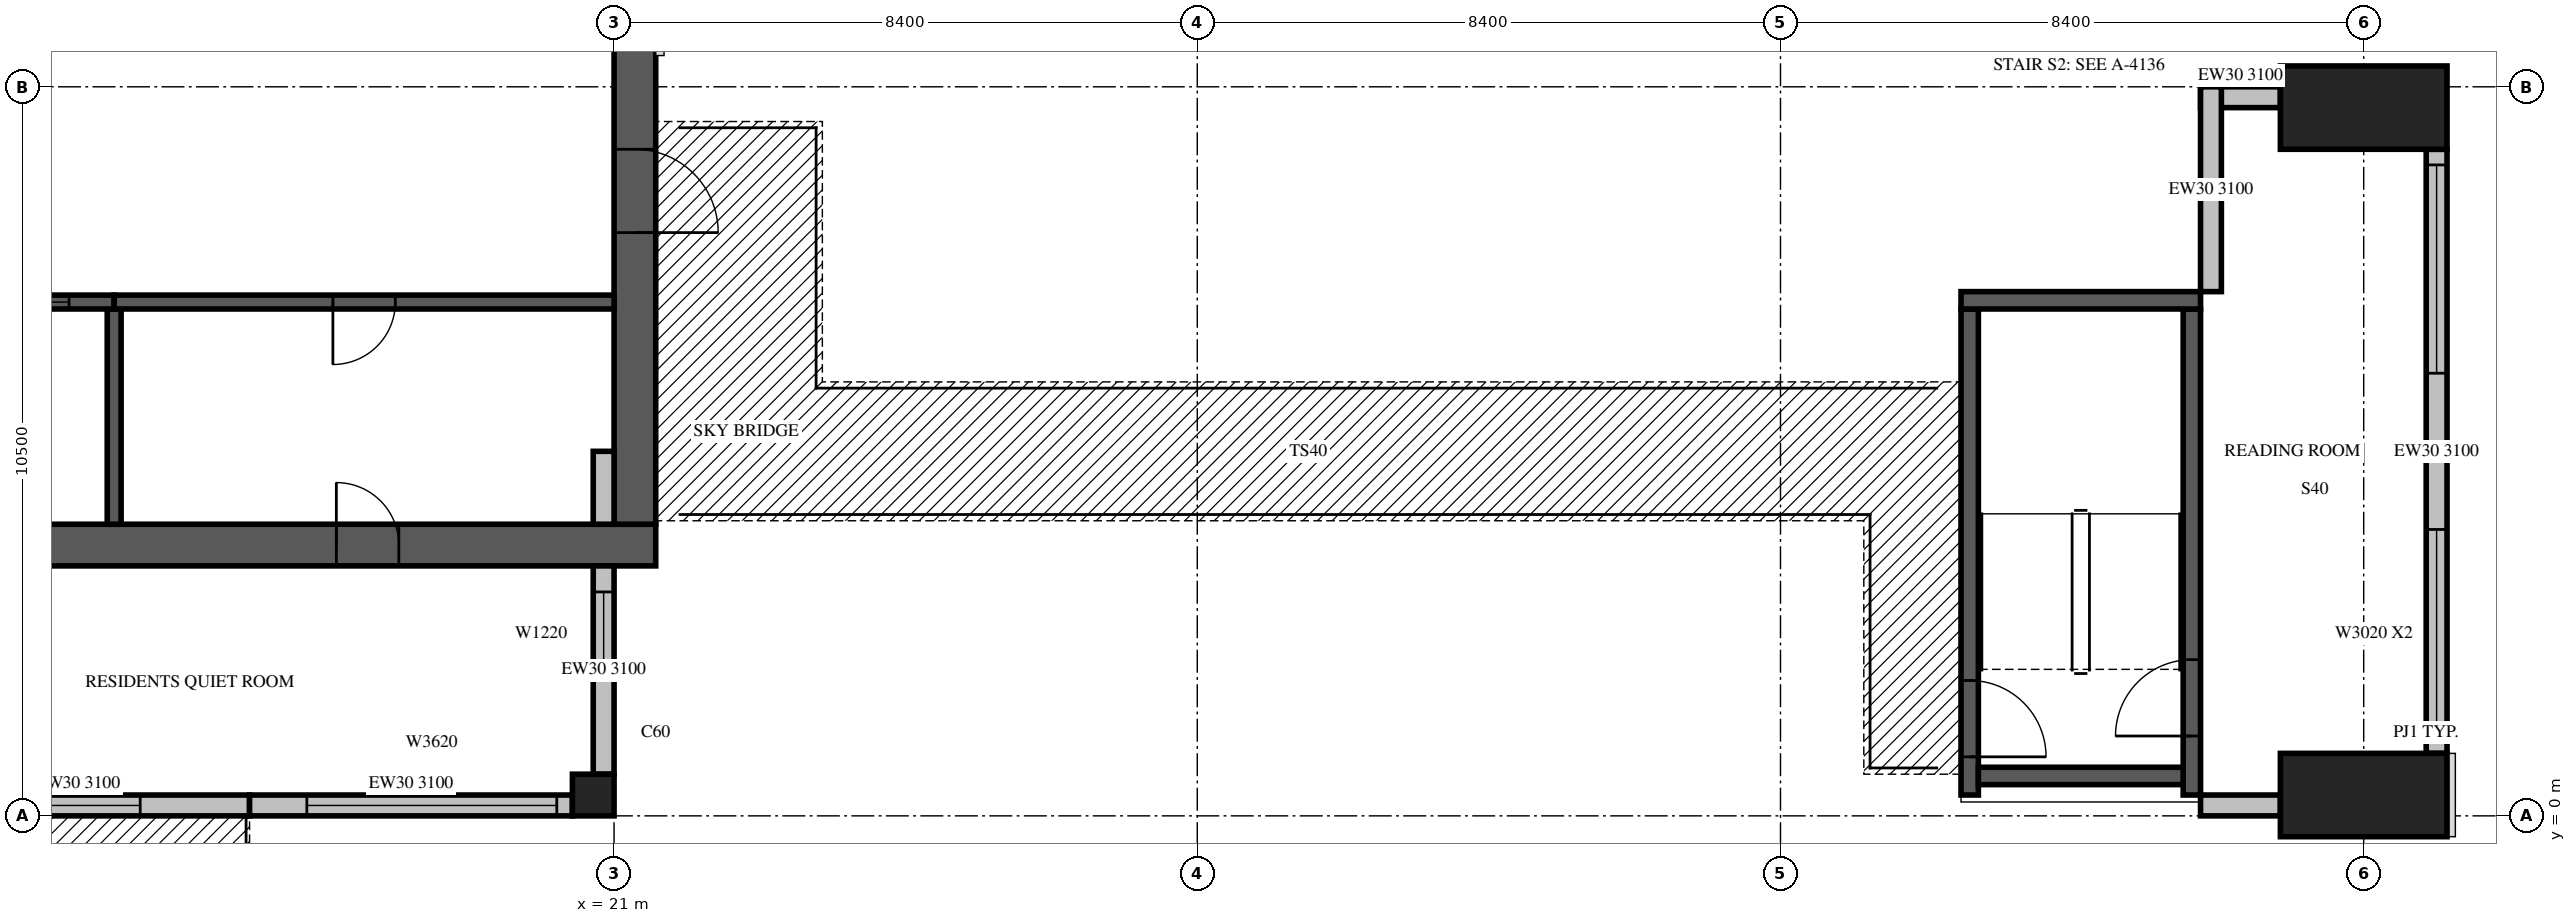
"""IFC4 building model, lengths in metres.
Left out: names, types, materials, properties, quantities, classifications, styles, units other than length and angle.
Written with IfcOpenShell. Run it as: python <this file> out.ifc"""

import sys

from ifc_helpers import new_model, si_unit, direction, frame, frame_2d, origin, origin_2d, place, context, subcontext, project, spatial, rectangle, extrude, source, transform, mapped, element, fill, save


model = new_model("IFC4")
c1 = context("Model", 3, precision=1e-05, world=origin(), true_north=direction((0.0, 1.0)))
c2 = subcontext(c1, "Body", "Model", "MODEL_VIEW")
j1 = project(units=[si_unit("LENGTHUNIT", "METRE"), si_unit("PLANEANGLEUNIT", "RADIAN")], contexts=[c1])
p1 = place(None, origin())
s1 = spatial("IfcSite", under=j1, at=p1, CompositionType="ELEMENT")
p2 = place(p1, origin())
s2 = spatial("IfcBuilding", under=s1, at=p2, CompositionType="ELEMENT")
p3 = place(p2, frame((0.0, 0.0, 347.5)))
s3 = spatial("IfcBuildingStorey", under=s2, at=p3, CompositionType="ELEMENT", Elevation=347.5)
m1 = source(origin(), c2, "Body", "SweptSolid", [
    extrude(rectangle(XDim=0.6, YDim=0.6, at=origin_2d()), origin(), (0.0, 0.0, 1.0), 3.5),
])
p4 = place(p3, frame((20.7, 0.3, 0.0), z_axis=(0.0, 0.0, 1.0), x_axis=(1.0, 0.0, 0.0)))
e1 = element("IfcColumn", 1, at=p4, inside=s3, PredefinedType="COLUMN", context=c2, shape_type="MappedRepresentation", body=[
    mapped(m1, transform((0.0, 0.0, 0.0), scale=1.0)),
])
m2 = source(origin(), c2, "Body", "SweptSolid", [
    extrude(rectangle(XDim=2.4, YDim=1.2, at=origin_2d()), origin(), (0.0, 0.0, 1.0), 3.5),
])
for number, where, z_axis, x_axis in (
    (2, (46.2, 0.3, 0.0), (0.0, 0.0, 1.0), (1.0, 0.0, 0.0)),
    (3, (46.2, 10.2, 0.0), (0.0, 0.0, 1.0), (1.0, 0.0, 0.0)),
):
    element("IfcColumn", number, at=place(p3, frame(where, z_axis=z_axis, x_axis=x_axis)), inside=s3, PredefinedType="PILASTER", context=c2, shape_type="MappedRepresentation", body=[
        mapped(m2, transform((0.0, 0.0, 0.0), scale=1.0)),
    ])
m3 = source(origin(), c2, "Body", "SweptSolid", [
    extrude(rectangle(XDim=17.4, YDim=0.6, at=frame_2d((8.7, 0.0))), origin(), (0.0, 0.0, 1.0), 3.5),
])
p5 = place(p3, frame((4.2, 3.9, 0.0), z_axis=(0.0, 0.0, 1.0), x_axis=(1.0, 0.0, 0.0)))
e4 = element("IfcWall", 4, at=p5, inside=s3, PredefinedType="SHEAR", context=c2, shape_type="MappedRepresentation", body=[
    mapped(m3, transform((0.0, 0.0, 0.0), scale=1.0)),
])
m4 = source(origin(), c2, "Body", "SweptSolid", [
    extrude(rectangle(XDim=0.9, YDim=2.1, at=frame_2d((0.45, 1.05))), frame((0.0, 0.31, 0.0), z_axis=(0.0, -1.0, 0.0), x_axis=(1.0, 0.0, 0.0)), (0.0, 0.0, 1.0), 0.62),
])
p6 = place(p5, frame((12.8, 0.0, 0.0)))
e5 = element("IfcOpeningElement", 5, at=p6, cuts=e4, PredefinedType="OPENING", context=c2, shape_type="MappedRepresentation", body=[
    mapped(m4, transform((0.0, 0.0, 0.0), scale=1.0)),
])
m5 = source(origin(), c2, "Body", "SweptSolid", [
    extrude(rectangle(XDim=16.8, YDim=0.6, at=frame_2d((8.4, 0.0))), origin(), (0.0, 0.0, 1.0), 3.5),
])
p7 = place(p3, frame((21.3, 4.2, 0.0), z_axis=(0.0, 0.0, 1.0), x_axis=(0.0, 1.0, 0.0)))
e6 = element("IfcWall", 6, at=p7, inside=s3, PredefinedType="SHEAR", context=c2, shape_type="MappedRepresentation", body=[
    mapped(m5, transform((0.0, 0.0, 0.0), scale=1.0)),
])
m6 = source(origin(), c2, "Body", "SweptSolid", [
    extrude(rectangle(XDim=1.2, YDim=2.1, at=frame_2d((0.6, 1.05))), frame((0.0, 0.31, 0.0), z_axis=(0.0, -1.0, 0.0), x_axis=(1.0, 0.0, 0.0)), (0.0, 0.0, 1.0), 0.62),
])
p8 = place(p7, frame((4.2, 0.0, 0.0)))
e7 = element("IfcOpeningElement", 7, at=p8, cuts=e6, PredefinedType="OPENING", context=c2, shape_type="MappedRepresentation", body=[
    mapped(m6, transform((0.0, 0.0, 0.0), scale=1.0)),
])
m7 = source(origin(), c2, "Body", "SweptSolid", [
    extrude(rectangle(XDim=1.2, YDim=2.4, at=frame_2d((0.6, 1.2))), frame((0.0, 0.31, 0.0), z_axis=(0.0, -1.0, 0.0), x_axis=(1.0, 0.0, 0.0)), (0.0, 0.0, 1.0), 0.62),
])
p9 = place(p7, frame((12.0, 0.0, 0.6)))
e8 = element("IfcOpeningElement", 8, at=p9, cuts=e6, PredefinedType="OPENING", context=c2, shape_type="MappedRepresentation", body=[
    mapped(m7, transform((0.0, 0.0, 0.0), scale=1.0)),
])
p10 = place(p3, frame((10.8, 0.15, 0.0), z_axis=(0.0, 0.0, 1.0), x_axis=(1.0, 0.0, 0.0)))
e9 = element("IfcWall", 9, at=p10, inside=s3, PredefinedType="STANDARD", context=c2, shape_type="SweptSolid", body=[
    extrude(rectangle(XDim=4.95, YDim=0.3, at=frame_2d((2.475, 0.0))), origin(), (0.0, 0.0, 1.0), 3.1),
])
m8 = source(origin(), c2, "Body", "SweptSolid", [
    extrude(rectangle(XDim=1.8, YDim=2.4, at=frame_2d((0.9, 1.2))), frame((0.0, 0.16, 0.0), z_axis=(0.0, -1.0, 0.0), x_axis=(1.0, 0.0, 0.0)), (0.0, 0.0, 1.0), 0.32),
])
p11 = place(p10, frame((1.575, 0.0, 0.0)))
e10 = element("IfcOpeningElement", 10, at=p11, cuts=e9, PredefinedType="OPENING", context=c2, shape_type="MappedRepresentation", body=[
    mapped(m8, transform((0.0, 0.0, 0.0), scale=1.0)),
])
p12 = place(p3, frame((15.75, 0.15, 0.0), z_axis=(0.0, 0.0, 1.0), x_axis=(1.0, 0.0, 0.0)))
e11 = element("IfcWall", 11, at=p12, inside=s3, PredefinedType="STANDARD", context=c2, shape_type="SweptSolid", body=[
    extrude(rectangle(XDim=4.65, YDim=0.3, at=frame_2d((2.325, 0.0))), origin(), (0.0, 0.0, 1.0), 3.1),
])
m9 = source(origin(), c2, "Body", "SweptSolid", [
    extrude(rectangle(XDim=3.6, YDim=2.0, at=frame_2d((1.8, 1.0))), frame((0.0, 0.16, 0.0), z_axis=(0.0, -1.0, 0.0), x_axis=(1.0, 0.0, 0.0)), (0.0, 0.0, 1.0), 0.32),
])
p13 = place(p12, frame((0.825, 0.0, 0.6)))
e12 = element("IfcOpeningElement", 12, at=p13, cuts=e11, PredefinedType="OPENING", context=c2, shape_type="MappedRepresentation", body=[
    mapped(m9, transform((0.0, 0.0, 0.0), scale=1.0)),
])
m10 = source(origin(), c2, "Body", "SweptSolid", [
    extrude(rectangle(XDim=3.0, YDim=0.3, at=frame_2d((1.5, 0.0))), origin(), (0.0, 0.0, 1.0), 3.1),
])
p14 = place(p3, frame((20.85, 0.6, 0.0), z_axis=(0.0, 0.0, 1.0), x_axis=(0.0, 1.0, 0.0)))
e13 = element("IfcWall", 13, at=p14, inside=s3, PredefinedType="STANDARD", context=c2, shape_type="MappedRepresentation", body=[
    mapped(m10, transform((0.0, 0.0, 0.0), scale=1.0)),
])
m11 = source(origin(), c2, "Body", "SweptSolid", [
    extrude(rectangle(XDim=1.2, YDim=2.0, at=frame_2d((0.6, 1.0))), frame((0.0, 0.16, 0.0), z_axis=(0.0, -1.0, 0.0), x_axis=(1.0, 0.0, 0.0)), (0.0, 0.0, 1.0), 0.32),
])
p15 = place(p14, frame((1.425, 0.0, 0.6)))
e14 = element("IfcOpeningElement", 14, at=p15, cuts=e13, PredefinedType="OPENING", context=c2, shape_type="MappedRepresentation", body=[
    mapped(m11, transform((0.0, 0.0, 0.0), scale=1.0)),
])
m12 = source(origin(), c2, "Body", "SweptSolid", [
    extrude(rectangle(XDim=1.05, YDim=0.3, at=frame_2d((0.525, 0.0))), origin(), (0.0, 0.0, 1.0), 3.1),
])
p16 = place(p3, frame((20.85, 4.2, 0.0), z_axis=(0.0, 0.0, 1.0), x_axis=(0.0, 1.0, 0.0)))
e15 = element("IfcWall", 15, at=p16, inside=s3, PredefinedType="STANDARD", context=c2, shape_type="MappedRepresentation", body=[
    mapped(m12, transform((0.0, 0.0, 0.0), scale=1.0)),
])
m13 = source(origin(), c2, "Body", "SweptSolid", [
    extrude(rectangle(XDim=1.15, YDim=0.3, at=frame_2d((0.575, 0.0))), origin(), (0.0, 0.0, 1.0), 3.1),
])
p17 = place(p3, frame((43.85, 0.15, 0.0), z_axis=(0.0, 0.0, 1.0), x_axis=(1.0, 0.0, 0.0)))
e16 = element("IfcWall", 16, at=p17, inside=s3, PredefinedType="STANDARD", context=c2, shape_type="MappedRepresentation", body=[
    mapped(m13, transform((0.0, 0.0, 0.0), scale=1.0)),
])
m14 = source(origin(), c2, "Body", "SweptSolid", [
    extrude(rectangle(XDim=8.7, YDim=0.3, at=frame_2d((4.35, 0.0))), origin(), (0.0, 0.0, 1.0), 3.1),
])
p18 = place(p3, frame((47.25, 0.9, 0.0), z_axis=(0.0, 0.0, 1.0), x_axis=(0.0, 1.0, 0.0)))
e17 = element("IfcWall", 17, at=p18, inside=s3, PredefinedType="STANDARD", context=c2, shape_type="MappedRepresentation", body=[
    mapped(m14, transform((0.0, 0.0, 0.0), scale=1.0)),
])
m15 = source(origin(), c2, "Body", "SweptSolid", [
    extrude(rectangle(XDim=3.0, YDim=2.0, at=frame_2d((1.5, 1.0))), frame((0.0, 0.16, 0.0), z_axis=(0.0, -1.0, 0.0), x_axis=(1.0, 0.0, 0.0)), (0.0, 0.0, 1.0), 0.32),
])
p19 = place(p18, frame((0.225, 0.0, 0.6)))
e18 = element("IfcOpeningElement", 18, at=p19, cuts=e17, PredefinedType="OPENING", context=c2, shape_type="MappedRepresentation", body=[
    mapped(m15, transform((0.0, 0.0, 0.0), scale=1.0)),
])
p20 = place(p18, frame((5.475, 0.0, 0.6)))
e19 = element("IfcOpeningElement", 19, at=p20, cuts=e17, PredefinedType="OPENING", context=c2, shape_type="MappedRepresentation", body=[
    mapped(m15, transform((0.0, 0.0, 0.0), scale=1.0)),
])
p21 = place(p3, frame((45.0, 10.35, 0.0), z_axis=(0.0, 0.0, 1.0), x_axis=(-1.0, 0.0, 0.0)))
e20 = element("IfcWall", 20, at=p21, inside=s3, PredefinedType="STANDARD", context=c2, shape_type="MappedRepresentation", body=[
    mapped(m13, transform((0.0, 0.0, 0.0), scale=1.0)),
])
m16 = source(origin(), c2, "Body", "SweptSolid", [
    extrude(rectangle(XDim=2.95, YDim=0.3, at=frame_2d((1.475, 0.0))), origin(), (0.0, 0.0, 1.0), 3.1),
])
p22 = place(p3, frame((44.0, 10.5, 0.0), z_axis=(0.0, 0.0, 1.0), x_axis=(0.0, -1.0, 0.0)))
e21 = element("IfcWall", 21, at=p22, inside=s3, PredefinedType="STANDARD", context=c2, shape_type="MappedRepresentation", body=[
    mapped(m16, transform((0.0, 0.0, 0.0), scale=1.0)),
])
m17 = source(origin(), c2, "Body", "SweptSolid", [
    extrude(rectangle(XDim=3.1, YDim=0.2, at=frame_2d((1.55, 0.0))), origin(), (0.0, 0.0, 1.0), 3.1),
])
p23 = place(p3, frame((13.8, 4.2, 0.0), z_axis=(0.0, 0.0, 1.0), x_axis=(0.0, 1.0, 0.0)))
e22 = element("IfcWall", 22, at=p23, inside=s3, PredefinedType="SOLIDWALL", context=c2, shape_type="MappedRepresentation", body=[
    mapped(m17, transform((0.0, 0.0, 0.0), scale=1.0)),
])
m18 = source(origin(), c2, "Body", "SweptSolid", [
    extrude(rectangle(XDim=9.6, YDim=0.2, at=frame_2d((4.8, 0.0))), origin(), (0.0, 0.0, 1.0), 3.5),
])
p24 = place(p3, frame((4.2, 7.4, 0.0), z_axis=(0.0, 0.0, 1.0), x_axis=(1.0, 0.0, 0.0)))
e23 = element("IfcWall", 23, at=p24, inside=s3, PredefinedType="SOLIDWALL", context=c2, shape_type="MappedRepresentation", body=[
    mapped(m18, transform((0.0, 0.0, 0.0), scale=1.0)),
])
m19 = source(origin(), c2, "Body", "SweptSolid", [
    extrude(rectangle(XDim=1.1, YDim=2.1, at=frame_2d((0.55, 1.05))), frame((0.0, 0.11, 0.0), z_axis=(0.0, -1.0, 0.0), x_axis=(1.0, 0.0, 0.0)), (0.0, 0.0, 1.0), 0.22),
])
p25 = place(p24, frame((0.65, 0.0, 0.0)))
e24 = element("IfcOpeningElement", 24, at=p25, cuts=e23, PredefinedType="OPENING", context=c2, shape_type="MappedRepresentation", body=[
    mapped(m19, transform((0.0, 0.0, 0.0), scale=1.0)),
])
p26 = place(p24, frame((3.05, 0.0, 0.0)))
e25 = element("IfcOpeningElement", 25, at=p26, cuts=e23, PredefinedType="OPENING", context=c2, shape_type="MappedRepresentation", body=[
    mapped(m19, transform((0.0, 0.0, 0.0), scale=1.0)),
])
p27 = place(p24, frame((5.45, 0.0, 0.0)))
e26 = element("IfcOpeningElement", 26, at=p27, cuts=e23, PredefinedType="OPENING", context=c2, shape_type="MappedRepresentation", body=[
    mapped(m19, transform((0.0, 0.0, 0.0), scale=1.0)),
])
p28 = place(p24, frame((7.85, 0.0, 0.0)))
e27 = element("IfcOpeningElement", 27, at=p28, cuts=e23, PredefinedType="OPENING", context=c2, shape_type="MappedRepresentation", body=[
    mapped(m19, transform((0.0, 0.0, 0.0), scale=1.0)),
])
m20 = source(origin(), c2, "Body", "SweptSolid", [
    extrude(rectangle(XDim=7.2, YDim=0.2, at=frame_2d((3.6, 0.0))), origin(), (0.0, 0.0, 1.0), 3.1),
])
p29 = place(p3, frame((13.8, 7.4, 0.0), z_axis=(0.0, 0.0, 1.0), x_axis=(1.0, 0.0, 0.0)))
e28 = element("IfcWall", 28, at=p29, inside=s3, PredefinedType="SOLIDWALL", context=c2, shape_type="MappedRepresentation", body=[
    mapped(m20, transform((0.0, 0.0, 0.0), scale=1.0)),
])
m21 = source(origin(), c2, "Body", "SweptSolid", [
    extrude(rectangle(XDim=0.9, YDim=2.1, at=frame_2d((0.45, 1.05))), frame((0.0, 0.11, 0.0), z_axis=(0.0, -1.0, 0.0), x_axis=(1.0, 0.0, 0.0)), (0.0, 0.0, 1.0), 0.22),
])
p30 = place(p29, frame((3.15, 0.0, 0.0)))
e29 = element("IfcOpeningElement", 29, at=p30, cuts=e28, PredefinedType="OPENING", context=c2, shape_type="MappedRepresentation", body=[
    mapped(m21, transform((0.0, 0.0, 0.0), scale=1.0)),
])
m22 = source(origin(), c2, "Body", "SweptSolid", [
    extrude(rectangle(XDim=7.0, YDim=0.25, at=frame_2d((3.5, 0.0))), origin(), (0.0, 0.0, 1.0), 3.1),
])
p31 = place(p3, frame((40.525, 0.3, 0.0), z_axis=(0.0, 0.0, 1.0), x_axis=(0.0, 1.0, 0.0)))
e30 = element("IfcWall", 30, at=p31, inside=s3, PredefinedType="SOLIDWALL", context=c2, shape_type="MappedRepresentation", body=[
    mapped(m22, transform((0.0, 0.0, 0.0), scale=1.0)),
])
m23 = source(origin(), c2, "Body", "SweptSolid", [
    extrude(rectangle(XDim=1.1, YDim=2.1, at=frame_2d((0.55, 1.05))), frame((0.0, 0.135, 0.0), z_axis=(0.0, -1.0, 0.0), x_axis=(1.0, 0.0, 0.0)), (0.0, 0.0, 1.0), 0.27),
])
p32 = place(p31, frame((0.55, 0.0, 0.0)))
e31 = element("IfcOpeningElement", 31, at=p32, cuts=e30, PredefinedType="OPENING", context=c2, shape_type="MappedRepresentation", body=[
    mapped(m23, transform((0.0, 0.0, 0.0), scale=1.0)),
])
p33 = place(p3, frame((43.725, 0.3, 0.0), z_axis=(0.0, 0.0, 1.0), x_axis=(0.0, 1.0, 0.0)))
e32 = element("IfcWall", 32, at=p33, inside=s3, PredefinedType="SOLIDWALL", context=c2, shape_type="MappedRepresentation", body=[
    mapped(m22, transform((0.0, 0.0, 0.0), scale=1.0)),
])
p34 = place(p33, frame((0.85, 0.0, 0.0)))
e33 = element("IfcOpeningElement", 33, at=p34, cuts=e32, PredefinedType="OPENING", context=c2, shape_type="MappedRepresentation", body=[
    mapped(m23, transform((0.0, 0.0, 0.0), scale=1.0)),
])
m24 = source(origin(), c2, "Body", "SweptSolid", [
    extrude(rectangle(XDim=3.45, YDim=0.25, at=frame_2d((1.725, 0.0))), origin(), (0.0, 0.0, 1.0), 3.1),
])
p35 = place(p3, frame((40.4, 7.425, 0.0), z_axis=(0.0, 0.0, 1.0), x_axis=(1.0, 0.0, 0.0)))
e34 = element("IfcWall", 34, at=p35, inside=s3, PredefinedType="SOLIDWALL", context=c2, shape_type="MappedRepresentation", body=[
    mapped(m24, transform((0.0, 0.0, 0.0), scale=1.0)),
])
m25 = source(origin(), c2, "Body", "SweptSolid", [
    extrude(rectangle(XDim=2.95, YDim=0.25, at=frame_2d((1.475, 0.0))), origin(), (0.0, 0.0, 1.0), 3.1),
])
p36 = place(p3, frame((40.65, 0.575, 0.0), z_axis=(0.0, 0.0, 1.0), x_axis=(1.0, 0.0, 0.0)))
e35 = element("IfcWall", 35, at=p36, inside=s3, PredefinedType="SOLIDWALL", context=c2, shape_type="MappedRepresentation", body=[
    mapped(m25, transform((0.0, 0.0, 0.0), scale=1.0)),
])
m26 = source(origin(), c2, "Body", "SweptSolid", [
    extrude(rectangle(XDim=1.8, YDim=2.4, at=frame_2d((0.9, 1.2))), frame((0.0, 0.025, 0.0), z_axis=(0.0, -1.0, 0.0), x_axis=(1.0, 0.0, 0.0)), (0.0, 0.0, 1.0), 0.05),
])
p37 = place(p11, origin())
e36 = element("IfcDoor", 36, at=p37, inside=s3, OperationType="SLIDING_TO_LEFT", PredefinedType="DOOR", context=c2, shape_type="MappedRepresentation", body=[
    mapped(m26, transform((0.0, 0.0, 0.0), scale=1.0)),
])
fill(e10, e36)
m27 = source(origin(), c2, "Body", "SweptSolid", [
    extrude(rectangle(XDim=3.6, YDim=2.0, at=frame_2d((1.8, 1.0))), frame((0.0, 0.03, 0.0), z_axis=(0.0, -1.0, 0.0), x_axis=(1.0, 0.0, 0.0)), (0.0, 0.0, 1.0), 0.06),
])
p38 = place(p13, origin())
e37 = element("IfcWindow", 37, at=p38, inside=s3, PartitioningType="SINGLE_PANEL", PredefinedType="WINDOW", context=c2, shape_type="MappedRepresentation", body=[
    mapped(m27, transform((0.0, 0.0, 0.0), scale=1.0)),
])
fill(e12, e37)
m28 = source(origin(), c2, "Body", "SweptSolid", [
    extrude(rectangle(XDim=1.2, YDim=2.0, at=frame_2d((0.6, 1.0))), frame((0.0, 0.03, 0.0), z_axis=(0.0, -1.0, 0.0), x_axis=(1.0, 0.0, 0.0)), (0.0, 0.0, 1.0), 0.06),
])
p39 = place(p15, origin())
e38 = element("IfcWindow", 38, at=p39, inside=s3, PartitioningType="SINGLE_PANEL", PredefinedType="WINDOW", context=c2, shape_type="MappedRepresentation", body=[
    mapped(m28, transform((0.0, 0.0, 0.0), scale=1.0)),
])
fill(e14, e38)
m29 = source(origin(), c2, "Body", "SweptSolid", [
    extrude(rectangle(XDim=3.0, YDim=2.0, at=frame_2d((1.5, 1.0))), frame((0.0, 0.03, 0.0), z_axis=(0.0, -1.0, 0.0), x_axis=(1.0, 0.0, 0.0)), (0.0, 0.0, 1.0), 0.06),
])
p40 = place(p19, origin())
e39 = element("IfcWindow", 39, at=p40, inside=s3, PartitioningType="SINGLE_PANEL", PredefinedType="WINDOW", context=c2, shape_type="MappedRepresentation", body=[
    mapped(m29, transform((0.0, 0.0, 0.0), scale=1.0)),
])
fill(e18, e39)
p41 = place(p20, origin())
e40 = element("IfcWindow", 40, at=p41, inside=s3, PartitioningType="SINGLE_PANEL", PredefinedType="WINDOW", context=c2, shape_type="MappedRepresentation", body=[
    mapped(m29, transform((0.0, 0.0, 0.0), scale=1.0)),
])
fill(e19, e40)
m30 = source(origin(), c2, "Body", "SweptSolid", [
    extrude(rectangle(XDim=1.1, YDim=2.1, at=frame_2d((0.55, 1.05))), frame((0.0, 0.025, 0.0), z_axis=(0.0, -1.0, 0.0), x_axis=(1.0, 0.0, 0.0)), (0.0, 0.0, 1.0), 0.05),
])
p42 = place(p28, origin())
e41 = element("IfcDoor", 41, at=p42, inside=s3, OperationType="SLIDING_TO_LEFT", PredefinedType="DOOR", context=c2, shape_type="MappedRepresentation", body=[
    mapped(m30, transform((0.0, 0.0, 0.0), scale=1.0)),
])
fill(e27, e41)
m31 = source(origin(), c2, "Body", "SweptSolid", [
    extrude(rectangle(XDim=0.9, YDim=2.1, at=frame_2d((0.45, 1.05))), frame((0.0, 0.025, 0.0), z_axis=(0.0, -1.0, 0.0), x_axis=(1.0, 0.0, 0.0)), (0.0, 0.0, 1.0), 0.05),
])
p43 = place(p30, origin())
e42 = element("IfcDoor", 42, at=p43, inside=s3, OperationType="SINGLE_SWING_RIGHT", PredefinedType="DOOR", context=c2, shape_type="MappedRepresentation", body=[
    mapped(m31, transform((0.0, 0.0, 0.0), scale=1.0)),
])
fill(e29, e42)
p44 = place(p32, origin())
e43 = element("IfcDoor", 43, at=p44, inside=s3, OperationType="SINGLE_SWING_RIGHT", PredefinedType="DOOR", context=c2, shape_type="MappedRepresentation", body=[
    mapped(m30, transform((0.0, 0.0, 0.0), scale=1.0)),
])
fill(e31, e43)
p45 = place(p34, origin())
e44 = element("IfcDoor", 44, at=p45, inside=s3, OperationType="SINGLE_SWING_LEFT", PredefinedType="DOOR", context=c2, shape_type="MappedRepresentation", body=[
    mapped(m30, transform((0.0, 0.0, 0.0), scale=1.0)),
])
fill(e33, e44)
m32 = source(origin(), c2, "Body", "SweptSolid", [
    extrude(rectangle(XDim=1.2, YDim=2.1, at=frame_2d((0.6, 1.05))), frame((0.0, 0.025, 0.0), z_axis=(0.0, -1.0, 0.0), x_axis=(1.0, 0.0, 0.0)), (0.0, 0.0, 1.0), 0.05),
])
p46 = place(p8, origin())
e45 = element("IfcDoor", 45, at=p46, inside=s3, OperationType="SINGLE_SWING_RIGHT", PredefinedType="DOOR", context=c2, shape_type="MappedRepresentation", body=[
    mapped(m32, transform((0.0, 0.0, 0.0), scale=1.0)),
])
fill(e7, e45)
p47 = place(p6, origin())
e46 = element("IfcDoor", 46, at=p47, inside=s3, OperationType="SINGLE_SWING_LEFT", PredefinedType="DOOR", context=c2, shape_type="MappedRepresentation", body=[
    mapped(m31, transform((0.0, 0.0, 0.0), scale=1.0)),
])
fill(e5, e46)
save(model, sys.argv[1])
